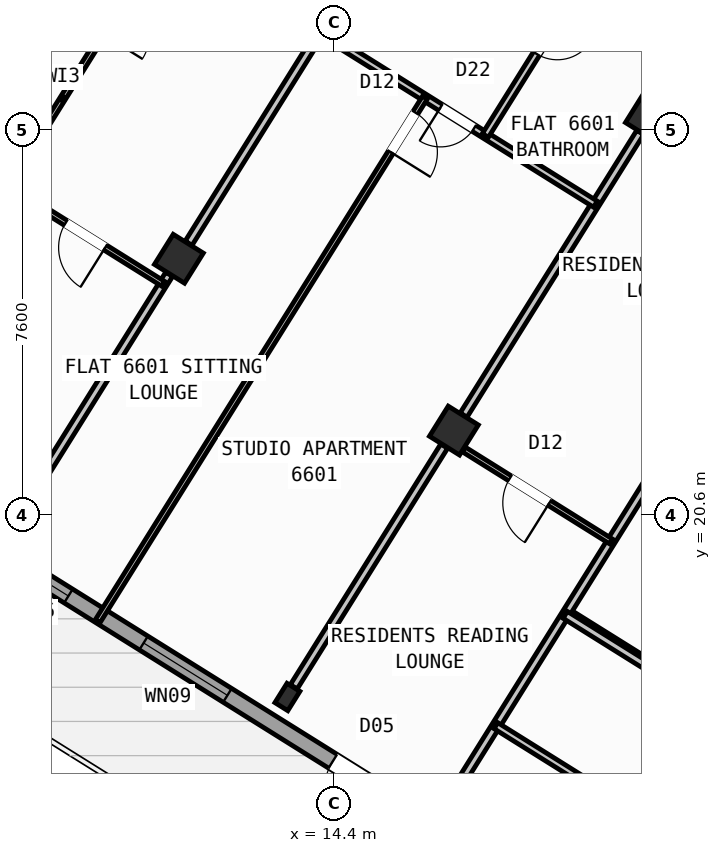
"""IFC4 building model, lengths in metres.
Left out: names, types, materials, properties, quantities, classifications, styles, units other than length and angle.
Written with IfcOpenShell. Run it as: python <this file> out.ifc"""

import sys

from ifc_helpers import new_model, si_unit, direction, frame, frame_2d, origin, origin_2d, place, context, subcontext, project, spatial, rectangle, hollow_rectangle, i_section, extrude, source, transform, mapped, element, fill, save


model = new_model("IFC4")
c1 = context("Model", 3, precision=1e-05, world=origin(), true_north=direction((0.0, 1.0)))
c2 = subcontext(c1, "Body", "Model", "MODEL_VIEW")
j1 = project(units=[si_unit("LENGTHUNIT", "METRE"), si_unit("PLANEANGLEUNIT", "RADIAN")], contexts=[c1])
p1 = place(None, origin())
s1 = spatial("IfcSite", under=j1, at=p1, CompositionType="ELEMENT")
p2 = place(p1, origin())
s2 = spatial("IfcBuilding", under=s1, at=p2, CompositionType="ELEMENT")
p3 = place(p2, frame((0.0, 0.0, 262.8)))
s3 = spatial("IfcBuildingStorey", under=s2, at=p3, CompositionType="ELEMENT", Elevation=262.8)
m1 = source(origin(), c2, "Body", "SweptSolid", [
    extrude(hollow_rectangle(XDim=0.7, YDim=0.7, WallThickness=0.028, at=origin_2d()), origin(), (0.0, 0.0, 1.0), 3.6),
])
for number, where, z_axis, x_axis in (
    (1, (20.632, 28.452, 0.0), (0.0, 0.0, 1.0), (-0.848, 0.53, 0.0)),
    (2, (16.764, 22.261, 0.0), (0.0, 0.0, 1.0), (-0.848, 0.53, 0.0)),
):
    element("IfcColumn", number, at=place(p3, frame(where, z_axis=z_axis, x_axis=x_axis)), inside=s3, PredefinedType="COLUMN", context=c2, shape_type="MappedRepresentation", body=[
        mapped(m1, transform((0.0, 0.0, 0.0), scale=1.0)),
    ])
m2 = source(origin(), c2, "Body", "SweptSolid", [
    extrude(i_section(OverallWidth=0.3, OverallDepth=0.45, WebThickness=0.014, FlangeThickness=0.026, at=origin_2d()), origin(), (0.0, 0.0, 1.0), 3.6),
])
p4 = place(p3, frame((13.478, 17.003, 0.0), z_axis=(0.0, 0.0, 1.0), x_axis=(-0.848048096156, 0.529919264233, 0.0)))
e3 = element("IfcColumn", 3, at=p4, inside=s3, PredefinedType="COLUMN", context=c2, shape_type="MappedRepresentation", body=[
    mapped(m2, transform((0.0, 0.0, 0.0), scale=1.0)),
])
p5 = place(p3, frame((11.336, 25.653, 0.0), z_axis=(0.0, 0.0, 1.0), x_axis=(-0.848048096156, 0.529919264233, 0.0)))
e4 = element("IfcColumn", 4, at=p5, inside=s3, PredefinedType="COLUMN", context=c2, shape_type="MappedRepresentation", body=[
    mapped(m1, transform((0.0, 0.0, 0.0), scale=1.0)),
])
p6 = place(p3, frame((29.268, 6.429, 0.0), z_axis=(0.0, 0.0, 1.0), x_axis=(-0.848049971435, 0.529916263149, 0.0)))
e5 = element("IfcWall", 5, at=p6, inside=s3, PredefinedType="STANDARD", context=c2, shape_type="SweptSolid", body=[
    extrude(rectangle(XDim=31.588, YDim=0.32, at=frame_2d((15.794, 0.0))), origin(), (0.0, 0.0, 1.0), 3.35),
])
p7 = place(p6, frame((16.362, 0.0, 0.0)))
e6 = element("IfcOpeningElement", 6, at=p7, cuts=e5, PredefinedType="OPENING", context=c2, shape_type="SweptSolid", body=[
    extrude(rectangle(XDim=1.2, YDim=2.15, at=frame_2d((0.6, 1.075))), frame((0.0, 0.17, 0.0), z_axis=(0.0, -1.0, 0.0), x_axis=(1.0, 0.0, 0.0)), (0.0, 0.0, 1.0), 0.34),
])
p8 = place(p6, frame((3.859, 0.0, 0.9)))
e7 = element("IfcOpeningElement", 7, at=p8, cuts=e5, PredefinedType="OPENING", context=c2, shape_type="SweptSolid", body=[
    extrude(rectangle(XDim=1.65, YDim=1.45, at=frame_2d((0.825, 0.725))), frame((0.0, 0.17, 0.0), z_axis=(0.0, -1.0, 0.0), x_axis=(1.0, 0.0, 0.0)), (0.0, 0.0, 1.0), 0.34),
])
p9 = place(p6, frame((10.519, 0.0, 0.9)))
e8 = element("IfcOpeningElement", 8, at=p9, cuts=e5, PredefinedType="OPENING", context=c2, shape_type="SweptSolid", body=[
    extrude(rectangle(XDim=1.65, YDim=1.45, at=frame_2d((0.825, 0.725))), frame((0.0, 0.17, 0.0), z_axis=(0.0, -1.0, 0.0), x_axis=(1.0, 0.0, 0.0)), (0.0, 0.0, 1.0), 0.34),
])
p10 = place(p6, frame((20.015, 0.0, 0.95)))
e9 = element("IfcOpeningElement", 9, at=p10, cuts=e5, PredefinedType="OPENING", context=c2, shape_type="SweptSolid", body=[
    extrude(rectangle(XDim=1.95, YDim=1.35, at=frame_2d((0.975, 0.675))), frame((0.0, 0.17, 0.0), z_axis=(0.0, -1.0, 0.0), x_axis=(1.0, 0.0, 0.0)), (0.0, 0.0, 1.0), 0.34),
])
p11 = place(p6, frame((23.715, 0.0, 1.0)))
e10 = element("IfcOpeningElement", 10, at=p11, cuts=e5, PredefinedType="OPENING", context=c2, shape_type="SweptSolid", body=[
    extrude(rectangle(XDim=0.9, YDim=1.25, at=frame_2d((0.45, 0.625))), frame((0.0, 0.17, 0.0), z_axis=(0.0, -1.0, 0.0), x_axis=(1.0, 0.0, 0.0)), (0.0, 0.0, 1.0), 0.34),
])
p12 = place(p6, frame((26.391, 0.0, 0.9)))
e11 = element("IfcOpeningElement", 11, at=p12, cuts=e5, PredefinedType="OPENING", context=c2, shape_type="SweptSolid", body=[
    extrude(rectangle(XDim=1.65, YDim=1.45, at=frame_2d((0.825, 0.725))), frame((0.0, 0.17, 0.0), z_axis=(0.0, -1.0, 0.0), x_axis=(1.0, 0.0, 0.0)), (0.0, 0.0, 1.0), 0.34),
])
p13 = place(p6, frame((29.878, 0.0, 1.0)))
e12 = element("IfcOpeningElement", 12, at=p13, cuts=e5, PredefinedType="OPENING", context=c2, shape_type="SweptSolid", body=[
    extrude(rectangle(XDim=0.9, YDim=1.25, at=frame_2d((0.45, 0.625))), frame((0.0, 0.17, 0.0), z_axis=(0.0, -1.0, 0.0), x_axis=(1.0, 0.0, 0.0)), (0.0, 0.0, 1.0), 0.34),
])
p14 = place(p3, frame((2.415, 23.452, 0.0), z_axis=(0.0, 0.0, 1.0), x_axis=(0.52991049553, 0.848053575387, 0.0)))
e13 = element("IfcWall", 13, at=p14, inside=s3, PredefinedType="STANDARD", context=c2, shape_type="SweptSolid", body=[
    extrude(rectangle(XDim=21.587, YDim=0.32, at=frame_2d((10.794, 0.0))), origin(), (0.0, 0.0, 1.0), 2.875),
])
p15 = place(p14, frame((2.606, 0.0, 0.9)))
e14 = element("IfcOpeningElement", 14, at=p15, cuts=e13, PredefinedType="OPENING", context=c2, shape_type="SweptSolid", body=[
    extrude(rectangle(XDim=1.65, YDim=1.45, at=frame_2d((0.825, 0.725))), frame((0.0, 0.17, 0.0), z_axis=(0.0, -1.0, 0.0), x_axis=(1.0, 0.0, 0.0)), (0.0, 0.0, 1.0), 0.34),
])
p16 = place(p14, frame((8.094, 0.0, 0.9)))
e15 = element("IfcOpeningElement", 15, at=p16, cuts=e13, PredefinedType="OPENING", context=c2, shape_type="SweptSolid", body=[
    extrude(rectangle(XDim=1.35, YDim=1.45, at=frame_2d((0.675, 0.725))), frame((0.0, 0.17, 0.0), z_axis=(0.0, -1.0, 0.0), x_axis=(1.0, 0.0, 0.0)), (0.0, 0.0, 1.0), 0.34),
])
p17 = place(p14, frame((11.044, 0.0, 0.9)))
e16 = element("IfcOpeningElement", 16, at=p17, cuts=e13, PredefinedType="OPENING", context=c2, shape_type="SweptSolid", body=[
    extrude(rectangle(XDim=1.35, YDim=1.45, at=frame_2d((0.675, 0.725))), frame((0.0, 0.17, 0.0), z_axis=(0.0, -1.0, 0.0), x_axis=(1.0, 0.0, 0.0)), (0.0, 0.0, 1.0), 0.34),
])
p18 = place(p14, frame((14.804, 0.0, 1.0)))
e17 = element("IfcOpeningElement", 17, at=p18, cuts=e13, PredefinedType="OPENING", context=c2, shape_type="SweptSolid", body=[
    extrude(rectangle(XDim=0.9, YDim=1.25, at=frame_2d((0.45, 0.625))), frame((0.0, 0.17, 0.0), z_axis=(0.0, -1.0, 0.0), x_axis=(1.0, 0.0, 0.0)), (0.0, 0.0, 1.0), 0.34),
])
p19 = place(p14, frame((19.384, 0.0, 1.0)))
e18 = element("IfcOpeningElement", 18, at=p19, cuts=e13, PredefinedType="OPENING", context=c2, shape_type="SweptSolid", body=[
    extrude(rectangle(XDim=0.9, YDim=1.25, at=frame_2d((0.45, 0.625))), frame((0.0, 0.17, 0.0), z_axis=(0.0, -1.0, 0.0), x_axis=(1.0, 0.0, 0.0)), (0.0, 0.0, 1.0), 0.34),
])
p20 = place(p3, frame((14.138, 41.825, 0.0), z_axis=(0.0, 0.0, 1.0), x_axis=(0.848046498049, -0.529921821731, 0.0)))
e19 = element("IfcWall", 19, at=p20, inside=s3, PredefinedType="STANDARD", context=c2, shape_type="SweptSolid", body=[
    extrude(rectangle(XDim=31.588, YDim=0.32, at=frame_2d((15.794, 0.0))), origin(), (0.0, 0.0, 1.0), 3.35),
])
p21 = place(p20, frame((3.568, 0.0, 0.0)))
e20 = element("IfcOpeningElement", 20, at=p21, cuts=e19, PredefinedType="OPENING", context=c2, shape_type="SweptSolid", body=[
    extrude(rectangle(XDim=1.05, YDim=2.15, at=frame_2d((0.525, 1.075))), frame((0.0, 0.17, 0.0), z_axis=(0.0, -1.0, 0.0), x_axis=(1.0, 0.0, 0.0)), (0.0, 0.0, 1.0), 0.34),
])
p22 = place(p20, frame((1.046, 0.0, 0.9)))
e21 = element("IfcOpeningElement", 21, at=p22, cuts=e19, PredefinedType="OPENING", context=c2, shape_type="SweptSolid", body=[
    extrude(rectangle(XDim=1.65, YDim=1.45, at=frame_2d((0.825, 0.725))), frame((0.0, 0.17, 0.0), z_axis=(0.0, -1.0, 0.0), x_axis=(1.0, 0.0, 0.0)), (0.0, 0.0, 1.0), 0.34),
])
p23 = place(p20, frame((8.61, 0.0, 0.9)))
e22 = element("IfcOpeningElement", 22, at=p23, cuts=e19, PredefinedType="OPENING", context=c2, shape_type="SweptSolid", body=[
    extrude(rectangle(XDim=1.35, YDim=1.45, at=frame_2d((0.675, 0.725))), frame((0.0, 0.17, 0.0), z_axis=(0.0, -1.0, 0.0), x_axis=(1.0, 0.0, 0.0)), (0.0, 0.0, 1.0), 0.34),
])
p24 = place(p20, frame((13.599, 0.0, 0.95)))
e23 = element("IfcOpeningElement", 23, at=p24, cuts=e19, PredefinedType="OPENING", context=c2, shape_type="SweptSolid", body=[
    extrude(rectangle(XDim=1.95, YDim=1.35, at=frame_2d((0.975, 0.675))), frame((0.0, 0.17, 0.0), z_axis=(0.0, -1.0, 0.0), x_axis=(1.0, 0.0, 0.0)), (0.0, 0.0, 1.0), 0.34),
])
p25 = place(p20, frame((17.154, 0.0, 1.0)))
e24 = element("IfcOpeningElement", 24, at=p25, cuts=e19, PredefinedType="OPENING", context=c2, shape_type="SweptSolid", body=[
    extrude(rectangle(XDim=0.9, YDim=1.25, at=frame_2d((0.45, 0.625))), frame((0.0, 0.17, 0.0), z_axis=(0.0, -1.0, 0.0), x_axis=(1.0, 0.0, 0.0)), (0.0, 0.0, 1.0), 0.34),
])
p26 = place(p20, frame((21.719, 0.0, 0.9)))
e25 = element("IfcOpeningElement", 25, at=p26, cuts=e19, PredefinedType="OPENING", context=c2, shape_type="SweptSolid", body=[
    extrude(rectangle(XDim=1.65, YDim=1.45, at=frame_2d((0.825, 0.725))), frame((0.0, 0.17, 0.0), z_axis=(0.0, -1.0, 0.0), x_axis=(1.0, 0.0, 0.0)), (0.0, 0.0, 1.0), 0.34),
])
p27 = place(p20, frame((27.419, 0.0, 0.9)))
e26 = element("IfcOpeningElement", 26, at=p27, cuts=e19, PredefinedType="OPENING", context=c2, shape_type="SweptSolid", body=[
    extrude(rectangle(XDim=1.65, YDim=1.45, at=frame_2d((0.825, 0.725))), frame((0.0, 0.17, 0.0), z_axis=(0.0, -1.0, 0.0), x_axis=(1.0, 0.0, 0.0)), (0.0, 0.0, 1.0), 0.34),
])
p28 = place(p3, frame((21.206, 17.292, 0.0), z_axis=(0.0, 0.0, 1.0), x_axis=(-0.848050851465, 0.529914854792, 0.0)))
e27 = element("IfcWall", 27, at=p28, inside=s3, PredefinedType="PARTITIONING", context=c2, shape_type="SweptSolid", body=[
    extrude(rectangle(XDim=2.61, YDim=0.16, at=frame_2d((1.305, 0.0))), origin(), (0.0, 0.0, 1.0), 3.34),
])
p29 = place(p3, frame((25.198, 28.606, 0.0), z_axis=(0.0, 0.0, 1.0), x_axis=(-0.529921796515, -0.848046513806, 0.0)))
e28 = element("IfcWall", 28, at=p29, inside=s3, PredefinedType="PARTITIONING", context=c2, shape_type="SweptSolid", body=[
    extrude(rectangle(XDim=16.5, YDim=0.16, at=frame_2d((8.25, 0.0))), origin(), (0.0, 0.0, 1.0), 3.34),
])
p30 = place(p3, frame((25.198, 28.606, 0.0), z_axis=(0.0, 0.0, 1.0), x_axis=(-0.848052408131, 0.529912363569, 0.0)))
e29 = element("IfcWall", 29, at=p30, inside=s3, PredefinedType="PARTITIONING", context=c2, shape_type="SweptSolid", body=[
    extrude(rectangle(XDim=16.73, YDim=0.16, at=frame_2d((8.365, 0.0))), origin(), (0.0, 0.0, 1.0), 3.34),
])
p31 = place(p30, frame((1.395, 0.0, 0.0)))
e30 = element("IfcOpeningElement", 30, at=p31, cuts=e29, PredefinedType="OPENING", context=c2, shape_type="SweptSolid", body=[
    extrude(rectangle(XDim=1.0, YDim=2.1, at=frame_2d((0.5, 1.05))), frame((0.0, 0.09, 0.0), z_axis=(0.0, -1.0, 0.0), x_axis=(1.0, 0.0, 0.0)), (0.0, 0.0, 1.0), 0.18),
])
p32 = place(p30, frame((7.82, 0.0, 0.0)))
e31 = element("IfcOpeningElement", 31, at=p32, cuts=e29, PredefinedType="OPENING", context=c2, shape_type="SweptSolid", body=[
    extrude(rectangle(XDim=1.0, YDim=2.1, at=frame_2d((0.5, 1.05))), frame((0.0, 0.09, 0.0), z_axis=(0.0, -1.0, 0.0), x_axis=(1.0, 0.0, 0.0)), (0.0, 0.0, 1.0), 0.18),
])
p33 = place(p30, frame((14.76, 0.0, 0.0)))
e32 = element("IfcOpeningElement", 32, at=p33, cuts=e29, PredefinedType="OPENING", context=c2, shape_type="SweptSolid", body=[
    extrude(rectangle(XDim=1.0, YDim=2.1, at=frame_2d((0.5, 1.05))), frame((0.0, 0.09, 0.0), z_axis=(0.0, -1.0, 0.0), x_axis=(1.0, 0.0, 0.0)), (0.0, 0.0, 1.0), 0.18),
])
p34 = place(p3, frame((20.44, 28.145, 0.0), z_axis=(0.0, 0.0, 1.0), x_axis=(-0.529938869374, -0.84803584519, 0.0)))
e33 = element("IfcWall", 33, at=p34, inside=s3, PredefinedType="PARTITIONING", context=c2, shape_type="SweptSolid", body=[
    extrude(rectangle(XDim=6.576, YDim=0.16, at=frame_2d((3.288, 0.0))), origin(), (0.0, 0.0, 1.0), 2.875),
])
p35 = place(p3, frame((16.572, 21.954, 0.0), z_axis=(0.0, 0.0, 1.0), x_axis=(-0.529904903214, -0.848057069748, 0.0)))
e34 = element("IfcWall", 34, at=p35, inside=s3, PredefinedType="PARTITIONING", context=c2, shape_type="SweptSolid", body=[
    extrude(rectangle(XDim=5.601, YDim=0.16, at=frame_2d((2.801, 0.0))), origin(), (0.0, 0.0, 1.0), 2.875),
])
p36 = place(p3, frame((19.865, 20.073, 0.0), z_axis=(0.0, 0.0, 1.0), x_axis=(-0.84807831592, 0.529870899433, 0.0)))
e35 = element("IfcWall", 35, at=p36, inside=s3, PredefinedType="PARTITIONING", context=c2, shape_type="SweptSolid", body=[
    extrude(rectangle(XDim=3.428, YDim=0.11, at=frame_2d((1.714, 0.0))), origin(), (0.0, 0.0, 1.0), 2.875),
])
p37 = place(p36, frame((1.435, 0.0, 0.0)))
e36 = element("IfcOpeningElement", 36, at=p37, cuts=e35, PredefinedType="OPENING", context=c2, shape_type="SweptSolid", body=[
    extrude(rectangle(XDim=0.92, YDim=2.08, at=frame_2d((0.46, 1.04))), frame((0.0, 0.065, 0.0), z_axis=(0.0, -1.0, 0.0), x_axis=(1.0, 0.0, 0.0)), (0.0, 0.0, 1.0), 0.13),
])
p38 = place(p3, frame((15.013, 31.537, 0.0), z_axis=(0.0, 0.0, 1.0), x_axis=(-0.529922185033, -0.848046271031, 0.0)))
e37 = element("IfcWall", 37, at=p38, inside=s3, PredefinedType="PARTITIONING", context=c2, shape_type="SweptSolid", body=[
    extrude(rectangle(XDim=6.576, YDim=0.16, at=frame_2d((3.288, 0.0))), origin(), (0.0, 0.0, 1.0), 2.875),
])
p39 = place(p3, frame((11.144, 25.346, 0.0), z_axis=(0.0, 0.0, 1.0), x_axis=(-0.529904903214, -0.848057069748, 0.0)))
e38 = element("IfcWall", 38, at=p39, inside=s3, PredefinedType="PARTITIONING", context=c2, shape_type="SweptSolid", body=[
    extrude(rectangle(XDim=5.601, YDim=0.16, at=frame_2d((2.801, 0.0))), origin(), (0.0, 0.0, 1.0), 2.875),
])
p40 = place(p3, frame((19.556, 26.73, 0.0), z_axis=(0.0, 0.0, 1.0), x_axis=(-0.848049732085, 0.529916646191, 0.0)))
e39 = element("IfcWall", 39, at=p40, inside=s3, PredefinedType="PLUMBINGWALL", context=c2, shape_type="SweptSolid", body=[
    extrude(rectangle(XDim=6.4, YDim=0.14, at=frame_2d((3.2, 0.0))), origin(), (0.0, 0.0, 1.0), 3.34),
])
p41 = place(p40, frame((2.824, 0.0, 0.0)))
e40 = element("IfcOpeningElement", 40, at=p41, cuts=e39, PredefinedType="OPENING", context=c2, shape_type="SweptSolid", body=[
    extrude(rectangle(XDim=0.78, YDim=2.05, at=frame_2d((0.39, 1.025))), frame((0.0, 0.08, 0.0), z_axis=(0.0, -1.0, 0.0), x_axis=(1.0, 0.0, 0.0)), (0.0, 0.0, 1.0), 0.16),
])
p42 = place(p3, frame((19.812, 31.971, 0.0), z_axis=(0.0, 0.0, 1.0), x_axis=(-0.529917480809, -0.848049210561, 0.0)))
e41 = element("IfcWall", 41, at=p42, inside=s3, PredefinedType="PLUMBINGWALL", context=c2, shape_type="SweptSolid", body=[
    extrude(rectangle(XDim=4.58, YDim=0.14, at=frame_2d((2.29, 0.0))), origin(), (0.0, 0.0, 1.0), 3.34),
])
p43 = place(p42, frame((1.9, 0.0, 0.0)))
e42 = element("IfcOpeningElement", 42, at=p43, cuts=e41, PredefinedType="OPENING", context=c2, shape_type="SweptSolid", body=[
    extrude(rectangle(XDim=0.78, YDim=2.05, at=frame_2d((0.39, 1.025))), frame((0.0, 0.08, 0.0), z_axis=(0.0, -1.0, 0.0), x_axis=(1.0, 0.0, 0.0)), (0.0, 0.0, 1.0), 0.16),
])
p44 = place(p3, frame((16.191, 28.833, 0.0), z_axis=(0.0, 0.0, 1.0), x_axis=(-0.529921526101, -0.84804668278, 0.0)))
e43 = element("IfcWall", 43, at=p44, inside=s3, PredefinedType="PARTITIONING", context=c2, shape_type="SweptSolid", body=[
    extrude(rectangle(XDim=12.19, YDim=0.11, at=frame_2d((6.095, 0.0))), origin(), (0.0, 0.0, 1.0), 3.34),
])
p45 = place(p44, frame((0.35, 0.0, 0.0)))
e44 = element("IfcOpeningElement", 44, at=p45, cuts=e43, PredefinedType="OPENING", context=c2, shape_type="SweptSolid", body=[
    extrude(rectangle(XDim=0.92, YDim=2.08, at=frame_2d((0.46, 1.04))), frame((0.0, 0.065, 0.0), z_axis=(0.0, -1.0, 0.0), x_axis=(1.0, 0.0, 0.0)), (0.0, 0.0, 1.0), 0.13),
])
p46 = place(p3, frame((13.486, 35.924, 0.0), z_axis=(0.0, 0.0, 1.0), x_axis=(-0.529920421309, -0.848047373134, 0.0)))
e45 = element("IfcWall", 45, at=p46, inside=s3, PredefinedType="PARTITIONING", context=c2, shape_type="SweptSolid", body=[
    extrude(rectangle(XDim=16.77, YDim=0.11, at=frame_2d((8.385, 0.0))), origin(), (0.0, 0.0, 1.0), 3.34),
])
p47 = place(p46, frame((0.76, 0.0, 0.0)))
e46 = element("IfcOpeningElement", 46, at=p47, cuts=e45, PredefinedType="OPENING", context=c2, shape_type="SweptSolid", body=[
    extrude(rectangle(XDim=0.78, YDim=2.05, at=frame_2d((0.39, 1.025))), frame((0.0, 0.065, 0.0), z_axis=(0.0, -1.0, 0.0), x_axis=(1.0, 0.0, 0.0)), (0.0, 0.0, 1.0), 0.13),
])
p48 = place(p46, frame((5.967, 0.0, 0.0)))
e47 = element("IfcOpeningElement", 47, at=p48, cuts=e45, PredefinedType="OPENING", context=c2, shape_type="SweptSolid", body=[
    extrude(rectangle(XDim=0.92, YDim=2.08, at=frame_2d((0.46, 1.04))), frame((0.0, 0.065, 0.0), z_axis=(0.0, -1.0, 0.0), x_axis=(1.0, 0.0, 0.0)), (0.0, 0.0, 1.0), 0.13),
])
p49 = place(p3, frame((11.027, 25.158, 0.0), z_axis=(0.0, 0.0, 1.0), x_axis=(-0.848051346257, 0.52991406295, 0.0)))
e48 = element("IfcWall", 48, at=p49, inside=s3, PredefinedType="PARTITIONING", context=c2, shape_type="SweptSolid", body=[
    extrude(rectangle(XDim=3.62, YDim=0.11, at=frame_2d((1.81, 0.0))), origin(), (0.0, 0.0, 1.0), 3.34),
])
p50 = place(p49, frame((1.35, 0.0, 0.0)))
e49 = element("IfcOpeningElement", 49, at=p50, cuts=e48, PredefinedType="OPENING", context=c2, shape_type="SweptSolid", body=[
    extrude(rectangle(XDim=0.92, YDim=2.08, at=frame_2d((0.46, 1.04))), frame((0.0, 0.065, 0.0), z_axis=(0.0, -1.0, 0.0), x_axis=(1.0, 0.0, 0.0)), (0.0, 0.0, 1.0), 0.13),
])
p51 = place(p3, frame((32.164, 10.374, 0.0), z_axis=(0.0, 0.0, 1.0), x_axis=(-0.848044107957, 0.529925646633, 0.0)))
e50 = element("IfcWall", 50, at=p51, inside=s3, PredefinedType="PARTITIONING", context=c2, shape_type="SweptSolid", body=[
    extrude(rectangle(XDim=15.57, YDim=0.16, at=frame_2d((7.785, 0.0))), origin(), (0.0, 0.0, 1.0), 3.34),
])
p52 = place(p51, frame((10.83, 0.0, 0.0)))
e51 = element("IfcOpeningElement", 51, at=p52, cuts=e50, PredefinedType="OPENING", context=c2, shape_type="SweptSolid", body=[
    extrude(rectangle(XDim=1.0, YDim=2.1, at=frame_2d((0.5, 1.05))), frame((0.0, 0.09, 0.0), z_axis=(0.0, -1.0, 0.0), x_axis=(1.0, 0.0, 0.0)), (0.0, 0.0, 1.0), 0.18),
])
p53 = place(p3, frame((29.72, 8.859, 0.0), z_axis=(0.0, 0.0, 1.0), x_axis=(-0.848049134363, 0.529917602752, 0.0)))
e52 = element("IfcWall", 52, at=p53, inside=s3, PredefinedType="PLUMBINGWALL", context=c2, shape_type="SweptSolid", body=[
    extrude(rectangle(XDim=14.3, YDim=0.14, at=frame_2d((7.15, 0.0))), origin(), (0.0, 0.0, 1.0), 3.34),
])
p54 = place(p53, frame((9.57, 0.0, 0.0)))
e53 = element("IfcOpeningElement", 53, at=p54, cuts=e52, PredefinedType="OPENING", context=c2, shape_type="SweptSolid", body=[
    extrude(rectangle(XDim=0.92, YDim=2.08, at=frame_2d((0.46, 1.04))), frame((0.0, 0.08, 0.0), z_axis=(0.0, -1.0, 0.0), x_axis=(1.0, 0.0, 0.0)), (0.0, 0.0, 1.0), 0.16),
])
m3 = source(origin(), c2, "Body", "SweptSolid", [
    extrude(rectangle(XDim=1.2, YDim=2.15, at=frame_2d((0.6, 1.075))), frame((0.0, 0.025, 0.0), z_axis=(0.0, -1.0, 0.0), x_axis=(1.0, 0.0, 0.0)), (0.0, 0.0, 1.0), 0.05),
])
p55 = place(p7, origin())
e54 = element("IfcDoor", 54, at=p55, inside=s3, OperationType="SINGLE_SWING_LEFT", PredefinedType="DOOR", context=c2, shape_type="MappedRepresentation", body=[
    mapped(m3, transform((0.0, 0.0, 0.0), scale=1.0)),
])
fill(e6, e54)
m4 = source(origin(), c2, "Body", "SweptSolid", [
    extrude(rectangle(XDim=1.95, YDim=1.35, at=frame_2d((0.975, 0.675))), frame((0.0, 0.03, 0.0), z_axis=(0.0, -1.0, 0.0), x_axis=(1.0, 0.0, 0.0)), (0.0, 0.0, 1.0), 0.06),
])
p56 = place(p10, origin())
e55 = element("IfcWindow", 55, at=p56, inside=s3, PartitioningType="SINGLE_PANEL", PredefinedType="WINDOW", context=c2, shape_type="MappedRepresentation", body=[
    mapped(m4, transform((0.0, 0.0, 0.0), scale=1.0)),
])
fill(e9, e55)
m5 = source(origin(), c2, "Body", "SweptSolid", [
    extrude(rectangle(XDim=0.9, YDim=1.25, at=frame_2d((0.45, 0.625))), frame((0.0, 0.03, 0.0), z_axis=(0.0, -1.0, 0.0), x_axis=(1.0, 0.0, 0.0)), (0.0, 0.0, 1.0), 0.06),
])
p57 = place(p11, origin())
e56 = element("IfcWindow", 56, at=p57, inside=s3, PartitioningType="SINGLE_PANEL", PredefinedType="WINDOW", context=c2, shape_type="MappedRepresentation", body=[
    mapped(m5, transform((0.0, 0.0, 0.0), scale=1.0)),
])
fill(e10, e56)
m6 = source(origin(), c2, "Body", "SweptSolid", [
    extrude(rectangle(XDim=0.92, YDim=2.08, at=frame_2d((0.46, 1.04))), frame((0.0, 0.025, 0.0), z_axis=(0.0, -1.0, 0.0), x_axis=(1.0, 0.0, 0.0)), (0.0, 0.0, 1.0), 0.05),
])
p58 = place(p37, origin())
e57 = element("IfcDoor", 57, at=p58, inside=s3, OperationType="SINGLE_SWING_LEFT", PredefinedType="DOOR", context=c2, shape_type="MappedRepresentation", body=[
    mapped(m6, transform((0.0, 0.0, 0.0), scale=1.0)),
])
fill(e36, e57)
p59 = place(p45, origin())
e58 = element("IfcDoor", 58, at=p59, inside=s3, OperationType="SINGLE_SWING_RIGHT", PredefinedType="DOOR", context=c2, shape_type="MappedRepresentation", body=[
    mapped(m6, transform((0.0, 0.0, 0.0), scale=1.0)),
])
fill(e44, e58)
m7 = source(origin(), c2, "Body", "SweptSolid", [
    extrude(rectangle(XDim=0.78, YDim=2.05, at=frame_2d((0.39, 1.025))), frame((0.0, 0.025, 0.0), z_axis=(0.0, -1.0, 0.0), x_axis=(1.0, 0.0, 0.0)), (0.0, 0.0, 1.0), 0.05),
])
p60 = place(p41, origin())
e59 = element("IfcDoor", 59, at=p60, inside=s3, OperationType="SINGLE_SWING_RIGHT", PredefinedType="DOOR", context=c2, shape_type="MappedRepresentation", body=[
    mapped(m7, transform((0.0, 0.0, 0.0), scale=1.0)),
])
fill(e40, e59)
p61 = place(p43, origin())
e60 = element("IfcDoor", 60, at=p61, inside=s3, OperationType="SINGLE_SWING_LEFT", PredefinedType="DOOR", context=c2, shape_type="MappedRepresentation", body=[
    mapped(m7, transform((0.0, 0.0, 0.0), scale=1.0)),
])
fill(e42, e60)
p62 = place(p50, origin())
e61 = element("IfcDoor", 61, at=p62, inside=s3, OperationType="SINGLE_SWING_LEFT", PredefinedType="DOOR", context=c2, shape_type="MappedRepresentation", body=[
    mapped(m6, transform((0.0, 0.0, 0.0), scale=1.0)),
])
fill(e49, e61)
save(model, sys.argv[1])
